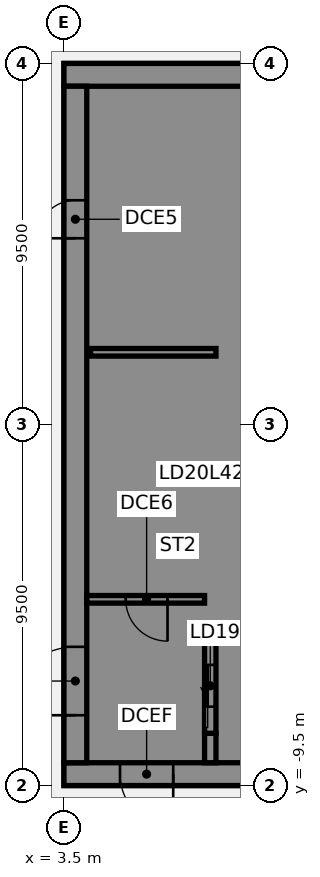
"""IFC4 building model, lengths in metres.
Left out: names, types, materials, properties, quantities, classifications, styles, units other than length and angle.
Written with IfcOpenShell. Run it as: python <this file> out.ifc"""

import sys

from ifc_helpers import new_model, si_unit, direction, frame, frame_2d, origin, place, context, subcontext, project, spatial, polyline, rectangle, outline, extrude, element, fill, save


model = new_model("IFC4")
c1 = context("Model", 3, precision=1e-05, world=origin(), true_north=direction((0.0, 1.0)))
c2 = subcontext(c1, "Body", "Model", "MODEL_VIEW")
j1 = project(units=[si_unit("LENGTHUNIT", "METRE"), si_unit("PLANEANGLEUNIT", "RADIAN")], contexts=[c1])
p1 = place(None, origin())
s1 = spatial("IfcSite", under=j1, at=p1, CompositionType="ELEMENT")
p2 = place(p1, origin())
s2 = spatial("IfcBuilding", under=s1, at=p2, CompositionType="ELEMENT")
p3 = place(p2, frame((0.0, 0.0, 170.5)))
s3 = spatial("IfcBuildingStorey", under=s2, at=p3, CompositionType="ELEMENT", Elevation=170.5)
p4 = place(p3, frame((16.5, -9.2, 0.0), z_axis=(0.0, 0.0, 1.0), x_axis=(-1.0, 0.0, 0.0)))
e1 = element("IfcWall", 1, at=p4, inside=s3, PredefinedType="SHEAR", context=c2, shape_type="SweptSolid", body=[
    extrude(rectangle(XDim=13.0, YDim=0.6, at=frame_2d((6.5, 0.0))), origin(), (0.0, 0.0, 1.0), 3.61),
])
p5 = place(p4, frame((4.15, 0.0, 0.0)))
e2 = element("IfcOpeningElement", 2, at=p5, cuts=e1, PredefinedType="OPENING", context=c2, shape_type="SweptSolid", body=[
    extrude(rectangle(XDim=1.4, YDim=2.1, at=frame_2d((0.7, 1.05))), frame((0.0, 0.31, 0.0), z_axis=(0.0, -1.0, 0.0), x_axis=(1.0, 0.0, 0.0)), (0.0, 0.0, 1.0), 0.62),
])
p6 = place(p4, frame((10.125, 0.0, 0.0)))
e3 = element("IfcOpeningElement", 3, at=p6, cuts=e1, PredefinedType="OPENING", context=c2, shape_type="SweptSolid", body=[
    extrude(rectangle(XDim=1.4, YDim=2.1, at=frame_2d((0.7, 1.05))), frame((0.0, 0.31, 0.0), z_axis=(0.0, -1.0, 0.0), x_axis=(1.0, 0.0, 0.0)), (0.0, 0.0, 1.0), 0.62),
])
p7 = place(p3, frame((16.5, 9.2, 0.0), z_axis=(0.0, 0.0, 1.0), x_axis=(-1.0, 0.0, 0.0)))
e4 = element("IfcWall", 4, at=p7, inside=s3, PredefinedType="SHEAR", context=c2, shape_type="SweptSolid", body=[
    extrude(rectangle(XDim=13.0, YDim=0.6, at=frame_2d((6.5, 0.0))), origin(), (0.0, 0.0, 1.0), 3.61),
])
p8 = place(p3, origin())
e5 = element("IfcWall", 5, at=p8, inside=s3, PredefinedType="SHEAR", context=c2, shape_type="SweptSolid", body=[
    extrude(outline(polyline([(9.8, -5.375), (7.5, -5.375), (7.5, -2.875), (9.8, -2.875), (9.8, -2.625), (7.5, -2.625), (7.5, -0.125), (9.8, -0.125), (9.8, 0.125), (7.5, 0.125), (7.5, 2.625), (9.8, 2.625), (9.8, 2.875), (7.5, 2.875), (7.5, 5.375), (9.8, 5.375), (9.8, 5.625), (7.5, 5.625), (7.5, 8.125), (9.8, 8.125), (9.8, 8.9), (7.5, 8.9), (7.2, 8.9), (7.2, -5.625), (7.5, -5.625), (9.8, -5.625), (9.8, -5.375)])), origin(), (0.0, 0.0, 1.0), 3.61),
])
p9 = place(p3, origin())
e6 = element("IfcWall", 6, at=p9, inside=s3, PredefinedType="SHEAR", context=c2, shape_type="SweptSolid", body=[
    extrude(outline(polyline([(7.5, -8.125), (7.5, -8.9), (9.8, -8.9), (9.8, -8.125), (9.8, -5.625), (9.55, -5.625), (9.55, -8.125), (7.5, -8.125)])), origin(), (0.0, 0.0, 1.0), 3.61),
])
p10 = place(p3, frame((7.35, -8.9, 0.0), z_axis=(0.0, 0.0, 1.0), x_axis=(0.0, 1.0, 0.0)))
e7 = element("IfcWall", 7, at=p10, inside=s3, PredefinedType="SHEAR", context=c2, shape_type="SweptSolid", body=[
    extrude(rectangle(XDim=0.775, YDim=0.3, at=frame_2d((0.387, 0.0))), origin(), (0.0, 0.0, 1.0), 3.61),
])
p11 = place(p3, frame((7.5, 1.9, 0.0), z_axis=(0.0, 0.0, 1.0), x_axis=(-1.0, 0.0, 0.0)))
e8 = element("IfcWall", 8, at=p11, inside=s3, PredefinedType="SHEAR", context=c2, shape_type="SweptSolid", body=[
    extrude(rectangle(XDim=3.3, YDim=0.2, at=frame_2d((1.65, 0.0))), origin(), (0.0, 0.0, 1.0), 3.61),
])
p12 = place(p3, frame((7.35, -8.125, 0.0), z_axis=(0.0, 0.0, 1.0), x_axis=(0.0, 1.0, 0.0)))
e9 = element("IfcWall", 9, at=p12, inside=s3, PredefinedType="SHEAR", context=c2, shape_type="SweptSolid", body=[
    extrude(rectangle(XDim=2.5, YDim=0.3, at=frame_2d((1.25, 0.0))), origin(), (0.0, 0.0, 1.0), 3.61),
])
p13 = place(p12, frame((0.7, 0.0, 0.0)))
e10 = element("IfcOpeningElement", 10, at=p13, cuts=e9, PredefinedType="OPENING", context=c2, shape_type="SweptSolid", body=[
    extrude(rectangle(XDim=1.1, YDim=2.1, at=frame_2d((0.55, 1.05))), frame((0.0, 0.16, 0.0), z_axis=(0.0, -1.0, 0.0), x_axis=(1.0, 0.0, 0.0)), (0.0, 0.0, 1.0), 0.32),
])
p14 = place(p3, frame((3.8, -8.9, 0.0), z_axis=(0.0, 0.0, 1.0), x_axis=(0.0, 1.0, 0.0)))
e11 = element("IfcWall", 11, at=p14, inside=s3, PredefinedType="SHEAR", context=c2, shape_type="SweptSolid", body=[
    extrude(rectangle(XDim=17.8, YDim=0.6, at=frame_2d((8.9, 0.0))), origin(), (0.0, 0.0, 1.0), 3.61),
])
p15 = place(p14, frame((1.25, 0.0, 0.0)))
e12 = element("IfcOpeningElement", 12, at=p15, cuts=e11, PredefinedType="OPENING", context=c2, shape_type="SweptSolid", body=[
    extrude(rectangle(XDim=1.8, YDim=2.1, at=frame_2d((0.9, 1.05))), frame((0.0, 0.31, 0.0), z_axis=(0.0, -1.0, 0.0), x_axis=(1.0, 0.0, 0.0)), (0.0, 0.0, 1.0), 0.62),
])
p16 = place(p14, frame((13.8, 0.0, 0.0)))
e13 = element("IfcOpeningElement", 13, at=p16, cuts=e11, PredefinedType="OPENING", context=c2, shape_type="SweptSolid", body=[
    extrude(rectangle(XDim=1.0, YDim=2.1, at=frame_2d((0.5, 1.05))), frame((0.0, 0.31, 0.0), z_axis=(0.0, -1.0, 0.0), x_axis=(1.0, 0.0, 0.0)), (0.0, 0.0, 1.0), 0.62),
])
p17 = place(p3, frame((7.2, -4.6, 0.0), z_axis=(0.0, 0.0, 1.0), x_axis=(-1.0, 0.0, 0.0)))
e14 = element("IfcWall", 14, at=p17, inside=s3, PredefinedType="SHEAR", context=c2, shape_type="SweptSolid", body=[
    extrude(rectangle(XDim=3.1, YDim=0.2, at=frame_2d((1.55, 0.0))), origin(), (0.0, 0.0, 1.0), 3.61),
])
p18 = place(p17, frame((0.975, 0.0, 0.0)))
e15 = element("IfcOpeningElement", 15, at=p18, cuts=e14, PredefinedType="OPENING", context=c2, shape_type="SweptSolid", body=[
    extrude(rectangle(XDim=1.1, YDim=2.1, at=frame_2d((0.55, 1.05))), frame((0.0, 0.11, 0.0), z_axis=(0.0, -1.0, 0.0), x_axis=(1.0, 0.0, 0.0)), (0.0, 0.0, 1.0), 0.22),
])
p19 = place(p6, origin())
e16 = element("IfcDoor", 16, at=p19, inside=s3, OperationType="SINGLE_SWING_LEFT", PredefinedType="DOOR", context=c2, shape_type="SweptSolid", body=[
    extrude(rectangle(XDim=1.4, YDim=2.1, at=frame_2d((0.7, 1.05))), frame((0.0, 0.025, 0.0), z_axis=(0.0, -1.0, 0.0), x_axis=(1.0, 0.0, 0.0)), (0.0, 0.0, 1.0), 0.05),
])
fill(e3, e16)
p20 = place(p15, origin())
e17 = element("IfcDoor", 17, at=p20, inside=s3, OperationType="SINGLE_SWING_LEFT", PredefinedType="DOOR", context=c2, shape_type="SweptSolid", body=[
    extrude(rectangle(XDim=1.8, YDim=2.1, at=frame_2d((0.9, 1.05))), frame((0.0, 0.025, 0.0), z_axis=(0.0, -1.0, 0.0), x_axis=(1.0, 0.0, 0.0)), (0.0, 0.0, 1.0), 0.05),
])
fill(e12, e17)
p21 = place(p16, origin())
e18 = element("IfcDoor", 18, at=p21, inside=s3, OperationType="SINGLE_SWING_LEFT", PredefinedType="DOOR", context=c2, shape_type="SweptSolid", body=[
    extrude(rectangle(XDim=1.0, YDim=2.1, at=frame_2d((0.5, 1.05))), frame((0.0, 0.025, 0.0), z_axis=(0.0, -1.0, 0.0), x_axis=(1.0, 0.0, 0.0)), (0.0, 0.0, 1.0), 0.05),
])
fill(e13, e18)
p22 = place(p18, origin())
e19 = element("IfcDoor", 19, at=p22, inside=s3, OperationType="SINGLE_SWING_LEFT", PredefinedType="DOOR", context=c2, shape_type="SweptSolid", body=[
    extrude(rectangle(XDim=1.1, YDim=2.1, at=frame_2d((0.55, 1.05))), frame((0.0, 0.025, 0.0), z_axis=(0.0, -1.0, 0.0), x_axis=(1.0, 0.0, 0.0)), (0.0, 0.0, 1.0), 0.05),
])
fill(e15, e19)
p23 = place(p13, origin())
e20 = element("IfcDoor", 20, at=p23, inside=s3, OperationType="SLIDING_TO_LEFT", PredefinedType="DOOR", context=c2, shape_type="SweptSolid", body=[
    extrude(rectangle(XDim=1.1, YDim=2.1, at=frame_2d((0.55, 1.05))), frame((0.0, 0.025, 0.0), z_axis=(0.0, -1.0, 0.0), x_axis=(1.0, 0.0, 0.0)), (0.0, 0.0, 1.0), 0.05),
])
fill(e10, e20)
save(model, sys.argv[1])
